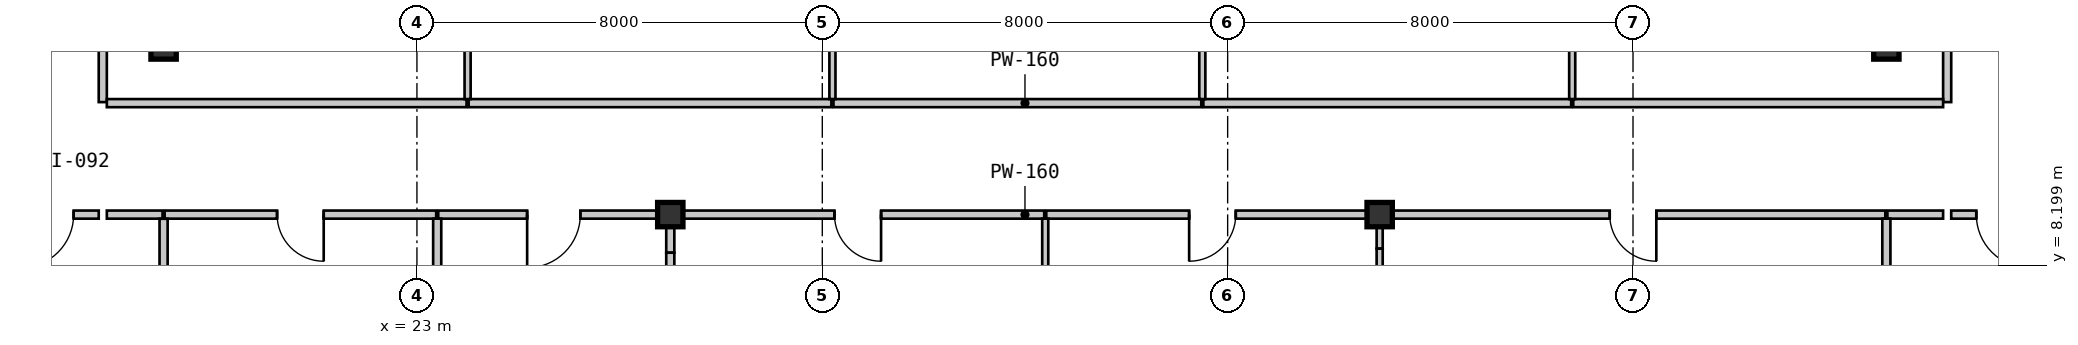
"""IFC4 building model, lengths in metres.
Left out: names, types, materials, properties, quantities, classifications, styles, units other than length and angle.
Written with IfcOpenShell. Run it as: python <this file> out.ifc"""

import sys

from ifc_helpers import new_model, si_unit, direction, frame, frame_2d, origin, origin_2d, place, context, subcontext, project, spatial, rectangle, i_section, extrude, source, transform, mapped, element, fill, save


model = new_model("IFC4")
c1 = context("Model", 3, precision=1e-05, world=origin(), true_north=direction((0.0, 1.0)))
c2 = subcontext(c1, "Body", "Model", "MODEL_VIEW")
j1 = project(units=[si_unit("LENGTHUNIT", "METRE"), si_unit("PLANEANGLEUNIT", "RADIAN")], contexts=[c1])
p1 = place(None, origin())
s1 = spatial("IfcSite", under=j1, at=p1, CompositionType="ELEMENT")
p2 = place(p1, origin())
s2 = spatial("IfcBuilding", under=s1, at=p2, CompositionType="ELEMENT")
p3 = place(p2, frame((0.0, 0.0, 32.55)))
s3 = spatial("IfcBuildingStorey", under=s2, at=p3, CompositionType="ELEMENT", Elevation=32.55)
m1 = source(origin(), c2, "Body", "SweptSolid", [
    extrude(i_section(OverallWidth=0.5, OverallDepth=0.48, WebThickness=0.028, FlangeThickness=0.044, at=origin_2d()), origin(), (0.0, 0.0, 1.0), 3.15),
])
for number, where, z_axis, x_axis in (
    (1, (28.0, 9.2, 0.0), (0.0, 0.0, 1.0), (1.0, 0.0, 0.0)),
    (2, (42.0, 9.2, 0.0), (0.0, 0.0, 1.0), (1.0, 0.0, 0.0)),
):
    element("IfcColumn", number, at=place(p3, frame(where, z_axis=z_axis, x_axis=x_axis)), inside=s3, PredefinedType="COLUMN", context=c2, shape_type="MappedRepresentation", body=[
        mapped(m1, transform((0.0, 0.0, 0.0), scale=1.0)),
    ])
m2 = source(origin(), c2, "Body", "SweptSolid", [
    extrude(i_section(OverallWidth=0.5, OverallDepth=0.464, WebThickness=0.022, FlangeThickness=0.034, at=origin_2d()), origin(), (0.0, 0.0, 1.0), 3.15),
])
for number, where, z_axis, x_axis in (
    (3, (18.0, 12.5, 0.0), (0.0, 0.0, 1.0), (1.0, 0.0, 0.0)),
    (4, (52.0, 12.5, 0.0), (0.0, 0.0, 1.0), (1.0, 0.0, 0.0)),
):
    element("IfcColumn", number, at=place(p3, frame(where, z_axis=z_axis, x_axis=x_axis)), inside=s3, PredefinedType="COLUMN", context=c2, shape_type="MappedRepresentation", body=[
        mapped(m2, transform((0.0, 0.0, 0.0), scale=1.0)),
    ])
m3 = source(origin(), c2, "Body", "SweptSolid", [
    extrude(rectangle(XDim=10.3, YDim=0.16, at=frame_2d((5.15, 0.0))), origin(), (0.0, 0.0, 1.0), 2.93),
])
p4 = place(p3, frame((16.8, 21.72, 0.0), z_axis=(0.0, 0.0, 1.0), x_axis=(0.0, -1.0, 0.0)))
e5 = element("IfcWall", 5, at=p4, inside=s3, PredefinedType="PARTITIONING", context=c2, shape_type="MappedRepresentation", body=[
    mapped(m3, transform((0.0, 0.0, 0.0), scale=1.0)),
])
m4 = source(origin(), c2, "Body", "SweptSolid", [
    extrude(rectangle(XDim=1.05, YDim=2.1, at=frame_2d((0.525, 1.05))), frame((0.0, 0.09, 0.0), z_axis=(0.0, -1.0, 0.0), x_axis=(1.0, 0.0, 0.0)), (0.0, 0.0, 1.0), 0.18),
])
p5 = place(p4, frame((4.595, 0.0, 0.0)))
e6 = element("IfcOpeningElement", 6, at=p5, cuts=e5, PredefinedType="OPENING", context=c2, shape_type="MappedRepresentation", body=[
    mapped(m4, transform((0.0, 0.0, 0.0), scale=1.0)),
])
p6 = place(p3, frame((53.2, 11.42, 0.0), z_axis=(0.0, 0.0, 1.0), x_axis=(0.0, 1.0, 0.0)))
e7 = element("IfcWall", 7, at=p6, inside=s3, PredefinedType="PARTITIONING", context=c2, shape_type="MappedRepresentation", body=[
    mapped(m3, transform((0.0, 0.0, 0.0), scale=1.0)),
])
p7 = place(p6, frame((4.655, 0.0, 0.0)))
e8 = element("IfcOpeningElement", 8, at=p7, cuts=e7, PredefinedType="OPENING", context=c2, shape_type="MappedRepresentation", body=[
    mapped(m4, transform((0.0, 0.0, 0.0), scale=1.0)),
])
m5 = source(origin(), c2, "Body", "SweptSolid", [
    extrude(rectangle(XDim=2.04, YDim=0.16, at=frame_2d((1.02, 0.0))), origin(), (0.0, 0.0, 1.0), 2.93),
])
p8 = place(p3, frame((16.72, 9.2, 0.0), z_axis=(0.0, 0.0, 1.0), x_axis=(-1.0, 0.0, 0.0)))
e9 = element("IfcWall", 9, at=p8, inside=s3, PredefinedType="PARTITIONING", context=c2, shape_type="MappedRepresentation", body=[
    mapped(m5, transform((0.0, 0.0, 0.0), scale=1.0)),
])
p9 = place(p8, frame((0.495, 0.0, 0.0)))
e10 = element("IfcOpeningElement", 10, at=p9, cuts=e9, PredefinedType="OPENING", context=c2, shape_type="MappedRepresentation", body=[
    mapped(m4, transform((0.0, 0.0, 0.0), scale=1.0)),
])
p10 = place(p3, frame((55.32, 9.2, 0.0), z_axis=(0.0, 0.0, 1.0), x_axis=(-1.0, 0.0, 0.0)))
e11 = element("IfcWall", 11, at=p10, inside=s3, PredefinedType="PARTITIONING", context=c2, shape_type="MappedRepresentation", body=[
    mapped(m5, transform((0.0, 0.0, 0.0), scale=1.0)),
])
p11 = place(p10, frame((0.495, 0.0, 0.0)))
e12 = element("IfcOpeningElement", 12, at=p11, cuts=e11, PredefinedType="OPENING", context=c2, shape_type="MappedRepresentation", body=[
    mapped(m4, transform((0.0, 0.0, 0.0), scale=1.0)),
])
m6 = source(origin(), c2, "Body", "SweptSolid", [
    extrude(rectangle(XDim=7.1, YDim=0.16, at=frame_2d((3.55, 0.0))), origin(), (0.0, 0.0, 1.0), 2.93),
])
p12 = place(p3, frame((16.88, 11.4, 0.0), z_axis=(0.0, 0.0, 1.0), x_axis=(1.0, 0.0, 0.0)))
e13 = element("IfcWall", 13, at=p12, inside=s3, PredefinedType="PARTITIONING", context=c2, shape_type="MappedRepresentation", body=[
    mapped(m6, transform((0.0, 0.0, 0.0), scale=1.0)),
])
m7 = source(origin(), c2, "Body", "SweptSolid", [
    extrude(rectangle(XDim=7.159, YDim=0.16, at=frame_2d((3.58, 0.0))), origin(), (0.0, 0.0, 1.0), 2.93),
])
p13 = place(p3, frame((24.02, 11.4, 0.0), z_axis=(0.0, 0.0, 1.0), x_axis=(1.0, 0.0, 0.0)))
e14 = element("IfcWall", 14, at=p13, inside=s3, PredefinedType="PARTITIONING", context=c2, shape_type="MappedRepresentation", body=[
    mapped(m7, transform((0.0, 0.0, 0.0), scale=1.0)),
])
m8 = source(origin(), c2, "Body", "SweptSolid", [
    extrude(rectangle(XDim=7.26, YDim=0.16, at=frame_2d((3.63, 0.0))), origin(), (0.0, 0.0, 1.0), 2.93),
])
for number, where, z_axis, x_axis in (
    (15, (31.22, 11.4, 0.0), (0.0, 0.0, 1.0), (1.0, 0.0, 0.0)),
    (16, (38.52, 11.4, 0.0), (0.0, 0.0, 1.0), (1.0, 0.0, 0.0)),
):
    element("IfcWall", number, at=place(p3, frame(where, z_axis=z_axis, x_axis=x_axis)), inside=s3, PredefinedType="PARTITIONING", context=c2, shape_type="MappedRepresentation", body=[
        mapped(m8, transform((0.0, 0.0, 0.0), scale=1.0)),
    ])
m9 = source(origin(), c2, "Body", "SweptSolid", [
    extrude(rectangle(XDim=7.3, YDim=0.16, at=frame_2d((3.65, 0.0))), origin(), (0.0, 0.0, 1.0), 2.93),
])
p14 = place(p3, frame((45.82, 11.4, 0.0), z_axis=(0.0, 0.0, 1.0), x_axis=(1.0, 0.0, 0.0)))
e17 = element("IfcWall", 17, at=p14, inside=s3, PredefinedType="PARTITIONING", context=c2, shape_type="MappedRepresentation", body=[
    mapped(m9, transform((0.0, 0.0, 0.0), scale=1.0)),
])
m10 = source(origin(), c2, "Body", "SweptSolid", [
    extrude(rectangle(XDim=1.1, YDim=0.16, at=frame_2d((0.55, 0.0))), origin(), (0.0, 0.0, 1.0), 2.93),
])
p15 = place(p3, frame((17.98, 9.2, 0.0), z_axis=(0.0, 0.0, 1.0), x_axis=(-1.0, 0.0, 0.0)))
e18 = element("IfcWall", 18, at=p15, inside=s3, PredefinedType="PARTITIONING", context=c2, shape_type="MappedRepresentation", body=[
    mapped(m10, transform((0.0, 0.0, 0.0), scale=1.0)),
])
m11 = source(origin(), c2, "Body", "SweptSolid", [
    extrude(rectangle(XDim=5.36, YDim=0.16, at=frame_2d((2.68, 0.0))), origin(), (0.0, 0.0, 1.0), 2.93),
])
p16 = place(p3, frame((23.38, 9.2, 0.0), z_axis=(0.0, 0.0, 1.0), x_axis=(-1.0, 0.0, 0.0)))
e19 = element("IfcWall", 19, at=p16, inside=s3, PredefinedType="PARTITIONING", context=c2, shape_type="MappedRepresentation", body=[
    mapped(m11, transform((0.0, 0.0, 0.0), scale=1.0)),
])
m12 = source(origin(), c2, "Body", "SweptSolid", [
    extrude(rectangle(XDim=0.92, YDim=2.1, at=frame_2d((0.46, 1.05))), frame((0.0, 0.09, 0.0), z_axis=(0.0, -1.0, 0.0), x_axis=(1.0, 0.0, 0.0)), (0.0, 0.0, 1.0), 0.18),
])
p17 = place(p16, frame((2.22, 0.0, 0.0)))
e20 = element("IfcOpeningElement", 20, at=p17, cuts=e19, PredefinedType="OPENING", context=c2, shape_type="MappedRepresentation", body=[
    mapped(m12, transform((0.0, 0.0, 0.0), scale=1.0)),
])
m13 = source(origin(), c2, "Body", "SweptSolid", [
    extrude(rectangle(XDim=4.559, YDim=0.16, at=frame_2d((2.28, 0.0))), origin(), (0.0, 0.0, 1.0), 2.93),
])
p18 = place(p3, frame((27.98, 9.2, 0.0), z_axis=(0.0, 0.0, 1.0), x_axis=(-1.0, 0.0, 0.0)))
e21 = element("IfcWall", 21, at=p18, inside=s3, PredefinedType="PARTITIONING", context=c2, shape_type="MappedRepresentation", body=[
    mapped(m13, transform((0.0, 0.0, 0.0), scale=1.0)),
])
p19 = place(p18, frame((1.755, 0.0, 0.0)))
e22 = element("IfcOpeningElement", 22, at=p19, cuts=e21, PredefinedType="OPENING", context=c2, shape_type="MappedRepresentation", body=[
    mapped(m4, transform((0.0, 0.0, 0.0), scale=1.0)),
])
m14 = source(origin(), c2, "Body", "SweptSolid", [
    extrude(rectangle(XDim=7.36, YDim=0.16, at=frame_2d((3.68, 0.0))), origin(), (0.0, 0.0, 1.0), 2.328),
])
p20 = place(p3, frame((35.38, 9.2, 0.0), z_axis=(0.0, 0.0, 1.0), x_axis=(-1.0, 0.0, 0.0)))
e23 = element("IfcWall", 23, at=p20, inside=s3, PredefinedType="PARTITIONING", context=c2, shape_type="MappedRepresentation", body=[
    mapped(m14, transform((0.0, 0.0, 0.0), scale=1.0)),
])
p21 = place(p20, frame((3.22, 0.0, 0.0)))
e24 = element("IfcOpeningElement", 24, at=p21, cuts=e23, PredefinedType="OPENING", context=c2, shape_type="MappedRepresentation", body=[
    mapped(m12, transform((0.0, 0.0, 0.0), scale=1.0)),
])
m15 = source(origin(), c2, "Body", "SweptSolid", [
    extrude(rectangle(XDim=6.56, YDim=0.16, at=frame_2d((3.28, 0.0))), origin(), (0.0, 0.0, 1.0), 2.328),
])
p22 = place(p3, frame((41.98, 9.2, 0.0), z_axis=(0.0, 0.0, 1.0), x_axis=(-1.0, 0.0, 0.0)))
e25 = element("IfcWall", 25, at=p22, inside=s3, PredefinedType="PARTITIONING", context=c2, shape_type="MappedRepresentation", body=[
    mapped(m15, transform((0.0, 0.0, 0.0), scale=1.0)),
])
p23 = place(p22, frame((2.82, 0.0, 0.0)))
e26 = element("IfcOpeningElement", 26, at=p23, cuts=e25, PredefinedType="OPENING", context=c2, shape_type="MappedRepresentation", body=[
    mapped(m12, transform((0.0, 0.0, 0.0), scale=1.0)),
])
m16 = source(origin(), c2, "Body", "SweptSolid", [
    extrude(rectangle(XDim=9.959, YDim=0.16, at=frame_2d((4.98, 0.0))), origin(), (0.0, 0.0, 1.0), 2.93),
])
p24 = place(p3, frame((51.98, 9.2, 0.0), z_axis=(0.0, 0.0, 1.0), x_axis=(-1.0, 0.0, 0.0)))
e27 = element("IfcWall", 27, at=p24, inside=s3, PredefinedType="PARTITIONING", context=c2, shape_type="MappedRepresentation", body=[
    mapped(m16, transform((0.0, 0.0, 0.0), scale=1.0)),
])
p25 = place(p24, frame((4.52, 0.0, 0.0)))
e28 = element("IfcOpeningElement", 28, at=p25, cuts=e27, PredefinedType="OPENING", context=c2, shape_type="MappedRepresentation", body=[
    mapped(m12, transform((0.0, 0.0, 0.0), scale=1.0)),
])
p26 = place(p3, frame((53.12, 9.2, 0.0), z_axis=(0.0, 0.0, 1.0), x_axis=(-1.0, 0.0, 0.0)))
e29 = element("IfcWall", 29, at=p26, inside=s3, PredefinedType="PARTITIONING", context=c2, shape_type="MappedRepresentation", body=[
    mapped(m10, transform((0.0, 0.0, 0.0), scale=1.0)),
])
m17 = source(origin(), c2, "Body", "SweptSolid", [
    extrude(rectangle(XDim=10.24, YDim=0.12, at=frame_2d((5.12, 0.0))), origin(), (0.0, 0.0, 1.0), 2.93),
])
for number, where, z_axis, x_axis in (
    (30, (24.0, 21.72, 0.0), (0.0, 0.0, 1.0), (0.0, -1.0, 0.0)),
    (31, (31.2, 21.72, 0.0), (0.0, 0.0, 1.0), (0.0, -1.0, 0.0)),
    (32, (38.5, 21.72, 0.0), (0.0, 0.0, 1.0), (0.0, -1.0, 0.0)),
    (33, (45.8, 21.72, 0.0), (0.0, 0.0, 1.0), (0.0, -1.0, 0.0)),
):
    element("IfcWall", number, at=place(p3, frame(where, z_axis=z_axis, x_axis=x_axis)), inside=s3, PredefinedType="PARTITIONING", context=c2, shape_type="MappedRepresentation", body=[
        mapped(m17, transform((0.0, 0.0, 0.0), scale=1.0)),
    ])
m18 = source(origin(), c2, "Body", "SweptSolid", [
    extrude(rectangle(XDim=7.386, YDim=0.16, at=frame_2d((3.693, 0.0))), origin(), (0.0, 0.0, 1.0), 2.93),
])
p27 = place(p3, frame((18.0, 9.118, 0.0), z_axis=(0.0, 0.0, 1.0), x_axis=(0.0, -1.0, 0.0)))
e34 = element("IfcWall", 34, at=p27, inside=s3, PredefinedType="PARTITIONING", context=c2, shape_type="MappedRepresentation", body=[
    mapped(m18, transform((0.0, 0.0, 0.0), scale=1.0)),
])
m19 = source(origin(), c2, "Body", "SweptSolid", [
    extrude(rectangle(XDim=2.45, YDim=0.16, at=frame_2d((1.225, 0.0))), origin(), (0.0, 0.0, 1.0), 2.93),
])
p28 = place(p3, frame((23.4, 9.12, 0.0), z_axis=(0.0, 0.0, 1.0), x_axis=(0.0, -1.0, 0.0)))
e35 = element("IfcWall", 35, at=p28, inside=s3, PredefinedType="PARTITIONING", context=c2, shape_type="MappedRepresentation", body=[
    mapped(m19, transform((0.0, 0.0, 0.0), scale=1.0)),
])
m20 = source(origin(), c2, "Body", "SweptSolid", [
    extrude(rectangle(XDim=0.67, YDim=0.16, at=frame_2d((0.335, 0.0))), origin(), (0.0, 0.0, 1.0), 2.397),
])
p29 = place(p3, frame((28.0, 9.118, 0.0), z_axis=(0.0, 0.0, 1.0), x_axis=(0.0, -1.0, 0.0)))
e36 = element("IfcWall", 36, at=p29, inside=s3, PredefinedType="PARTITIONING", context=c2, shape_type="MappedRepresentation", body=[
    mapped(m20, transform((0.0, 0.0, 0.0), scale=1.0)),
])
m21 = source(origin(), c2, "Body", "SweptSolid", [
    extrude(rectangle(XDim=6.716, YDim=0.16, at=frame_2d((3.358, 0.0))), origin(), (0.0, 0.0, 1.0), 2.93),
])
p30 = place(p3, frame((28.0, 8.448, 0.0), z_axis=(0.0, 0.0, 1.0), x_axis=(0.0, -1.0, 0.0)))
e37 = element("IfcWall", 37, at=p30, inside=s3, PredefinedType="PARTITIONING", context=c2, shape_type="MappedRepresentation", body=[
    mapped(m21, transform((0.0, 0.0, 0.0), scale=1.0)),
])
m22 = source(origin(), c2, "Body", "SweptSolid", [
    extrude(rectangle(XDim=7.39, YDim=0.12, at=frame_2d((3.695, 0.0))), origin(), (0.0, 0.0, 1.0), 2.93),
])
p31 = place(p3, frame((35.4, 9.12, 0.0), z_axis=(0.0, 0.0, 1.0), x_axis=(0.0, -1.0, 0.0)))
e38 = element("IfcWall", 38, at=p31, inside=s3, PredefinedType="PARTITIONING", context=c2, shape_type="MappedRepresentation", body=[
    mapped(m22, transform((0.0, 0.0, 0.0), scale=1.0)),
])
m23 = source(origin(), c2, "Body", "SweptSolid", [
    extrude(rectangle(XDim=0.592, YDim=0.12, at=frame_2d((0.296, 0.0))), origin(), (0.0, 0.0, 1.0), 2.397),
])
p32 = place(p3, frame((42.0, 9.12, 0.0), z_axis=(0.0, 0.0, 1.0), x_axis=(0.0, -1.0, 0.0)))
e39 = element("IfcWall", 39, at=p32, inside=s3, PredefinedType="PARTITIONING", context=c2, shape_type="MappedRepresentation", body=[
    mapped(m23, transform((0.0, 0.0, 0.0), scale=1.0)),
])
m24 = source(origin(), c2, "Body", "SweptSolid", [
    extrude(rectangle(XDim=6.798, YDim=0.12, at=frame_2d((3.399, 0.0))), origin(), (0.0, 0.0, 1.0), 2.93),
])
p33 = place(p3, frame((42.0, 8.528, 0.0), z_axis=(0.0, 0.0, 1.0), x_axis=(0.0, -1.0, 0.0)))
e40 = element("IfcWall", 40, at=p33, inside=s3, PredefinedType="PARTITIONING", context=c2, shape_type="MappedRepresentation", body=[
    mapped(m24, transform((0.0, 0.0, 0.0), scale=1.0)),
])
p34 = place(p3, frame((52.0, 9.12, 0.0), z_axis=(0.0, 0.0, 1.0), x_axis=(0.0, -1.0, 0.0)))
e41 = element("IfcWall", 41, at=p34, inside=s3, PredefinedType="PARTITIONING", context=c2, shape_type="MappedRepresentation", body=[
    mapped(m19, transform((0.0, 0.0, 0.0), scale=1.0)),
])
m25 = source(origin(), c2, "Body", "SweptSolid", [
    extrude(rectangle(XDim=1.05, YDim=2.1, at=frame_2d((0.525, 1.05))), frame((0.0, 0.025, 0.0), z_axis=(0.0, -1.0, 0.0), x_axis=(1.0, 0.0, 0.0)), (0.0, 0.0, 1.0), 0.05),
])
p35 = place(p9, origin())
e42 = element("IfcDoor", 42, at=p35, inside=s3, OperationType="SINGLE_SWING_RIGHT", PredefinedType="DOOR", context=c2, shape_type="MappedRepresentation", body=[
    mapped(m25, transform((0.0, 0.0, 0.0), scale=1.0)),
])
fill(e10, e42)
p36 = place(p11, origin())
e43 = element("IfcDoor", 43, at=p36, inside=s3, OperationType="SINGLE_SWING_LEFT", PredefinedType="DOOR", context=c2, shape_type="MappedRepresentation", body=[
    mapped(m25, transform((0.0, 0.0, 0.0), scale=1.0)),
])
fill(e12, e43)
m26 = source(origin(), c2, "Body", "SweptSolid", [
    extrude(rectangle(XDim=0.92, YDim=2.1, at=frame_2d((0.46, 1.05))), frame((0.0, 0.025, 0.0), z_axis=(0.0, -1.0, 0.0), x_axis=(1.0, 0.0, 0.0)), (0.0, 0.0, 1.0), 0.05),
])
p37 = place(p17, origin())
e44 = element("IfcDoor", 44, at=p37, inside=s3, OperationType="SINGLE_SWING_LEFT", PredefinedType="DOOR", context=c2, shape_type="MappedRepresentation", body=[
    mapped(m26, transform((0.0, 0.0, 0.0), scale=1.0)),
])
fill(e20, e44)
p38 = place(p19, origin())
e45 = element("IfcDoor", 45, at=p38, inside=s3, OperationType="SINGLE_SWING_RIGHT", PredefinedType="DOOR", context=c2, shape_type="MappedRepresentation", body=[
    mapped(m25, transform((0.0, 0.0, 0.0), scale=1.0)),
])
fill(e22, e45)
p39 = place(p21, origin())
e46 = element("IfcDoor", 46, at=p39, inside=s3, OperationType="SINGLE_SWING_LEFT", PredefinedType="DOOR", context=c2, shape_type="MappedRepresentation", body=[
    mapped(m26, transform((0.0, 0.0, 0.0), scale=1.0)),
])
fill(e24, e46)
p40 = place(p23, origin())
e47 = element("IfcDoor", 47, at=p40, inside=s3, OperationType="SINGLE_SWING_RIGHT", PredefinedType="DOOR", context=c2, shape_type="MappedRepresentation", body=[
    mapped(m26, transform((0.0, 0.0, 0.0), scale=1.0)),
])
fill(e26, e47)
p41 = place(p25, origin())
e48 = element("IfcDoor", 48, at=p41, inside=s3, OperationType="SINGLE_SWING_LEFT", PredefinedType="DOOR", context=c2, shape_type="MappedRepresentation", body=[
    mapped(m26, transform((0.0, 0.0, 0.0), scale=1.0)),
])
fill(e28, e48)
save(model, sys.argv[1])
